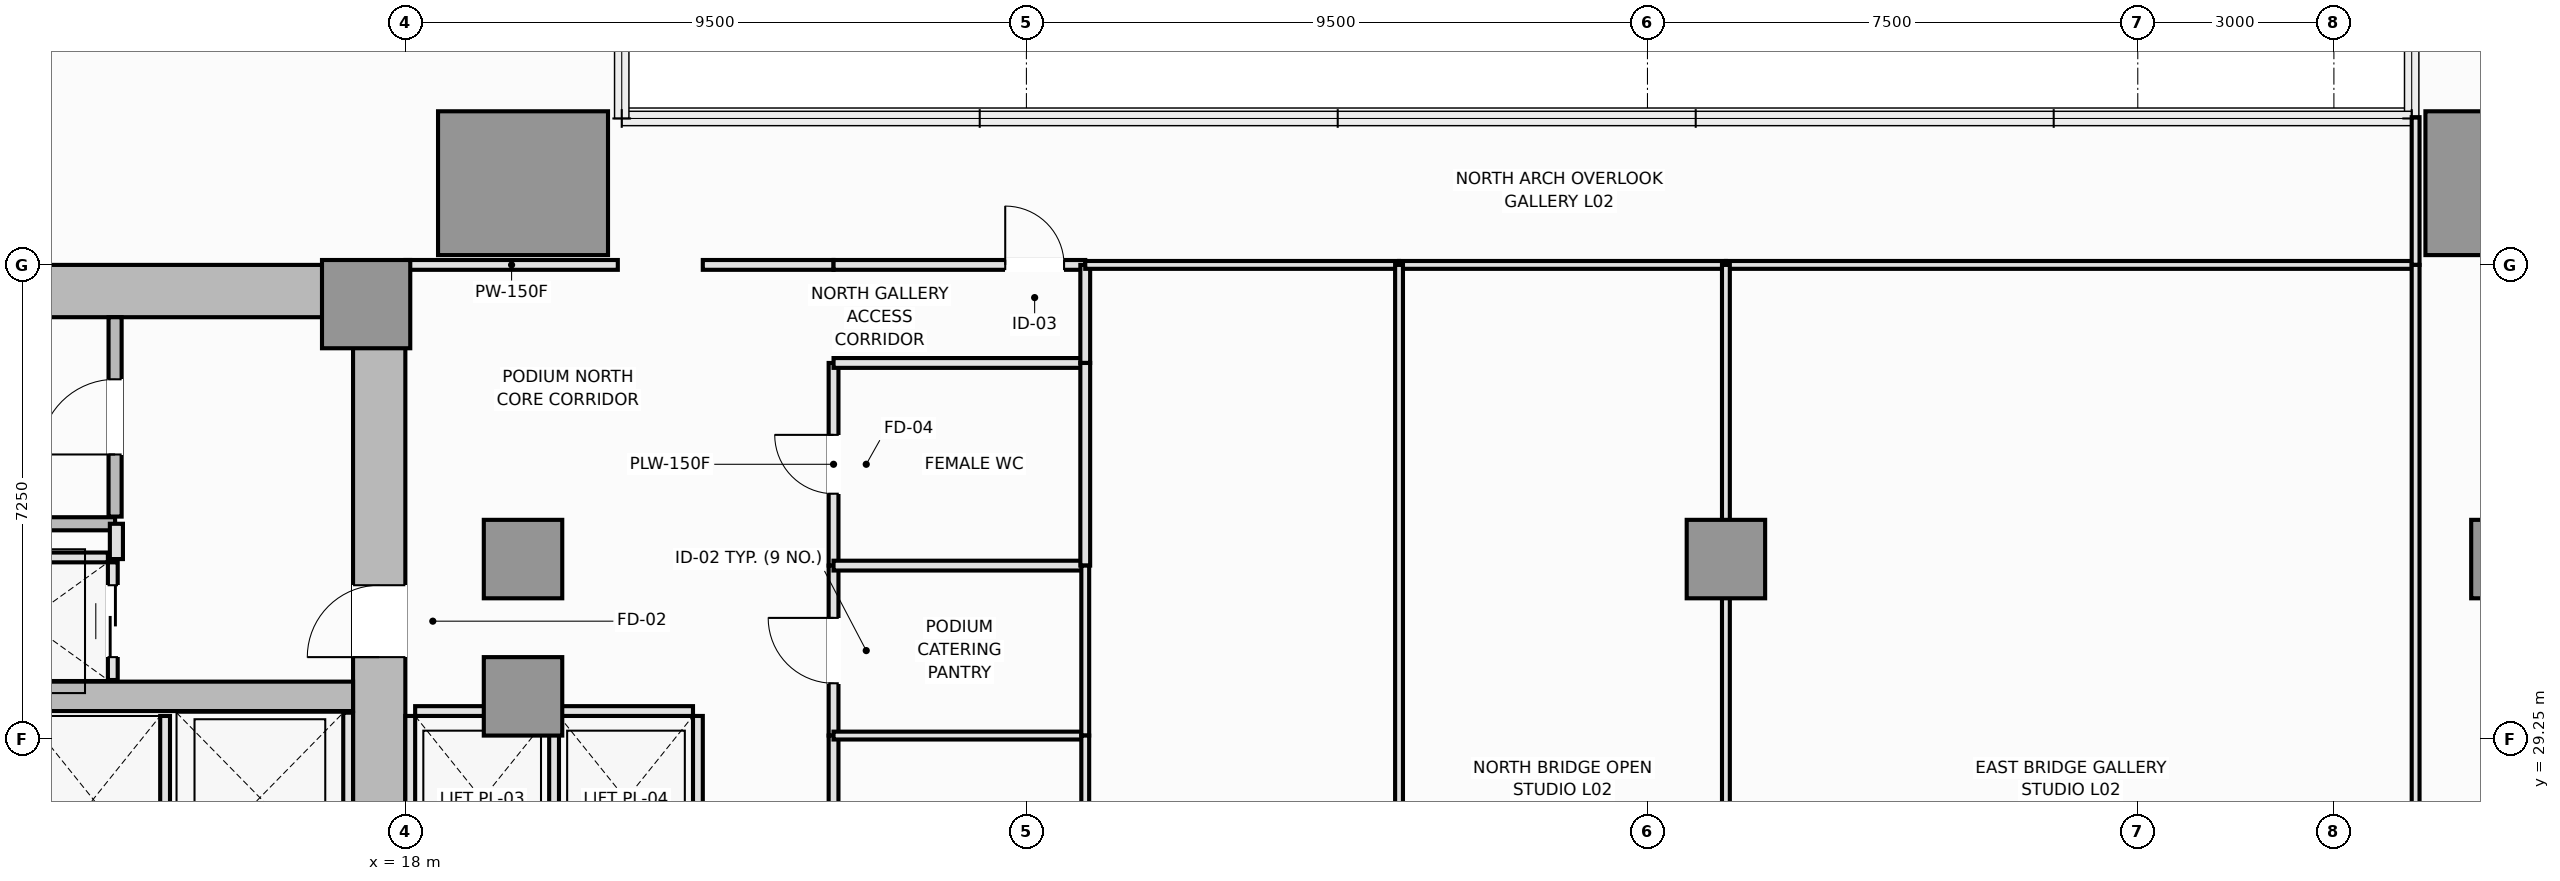
"""IFC4 building model, lengths in metres.
Left out: names, types, materials, properties, quantities, classifications, styles, units other than length and angle.
Written with IfcOpenShell. Run it as: python <this file> out.ifc"""

import sys

from ifc_helpers import new_model, si_unit, direction, frame, frame_2d, origin, origin_2d, place, context, subcontext, project, spatial, rectangle, extrude, element, fill, save


model = new_model("IFC4")
c1 = context("Model", 3, precision=1e-05, world=origin(), true_north=direction((0.0, 1.0)))
c2 = subcontext(c1, "Body", "Model", "MODEL_VIEW")
j1 = project(units=[si_unit("LENGTHUNIT", "METRE"), si_unit("PLANEANGLEUNIT", "RADIAN")], contexts=[c1])
p1 = place(None, origin())
s1 = spatial("IfcSite", under=j1, at=p1, CompositionType="ELEMENT")
p2 = place(p1, origin())
s2 = spatial("IfcBuilding", under=s1, at=p2, CompositionType="ELEMENT")
p3 = place(p2, frame((0.0, 0.0, 10.8)))
s3 = spatial("IfcBuildingStorey", under=s2, at=p3, CompositionType="ELEMENT", Elevation=10.8)
p4 = place(p3, frame((4.5, 36.1, 0.0), z_axis=(0.0, 0.0, 1.0), x_axis=(1.0, 0.0, 0.0)))
e1 = element("IfcWall", 1, at=p4, inside=s3, PredefinedType="SHEAR", context=c2, shape_type="SweptSolid", body=[
    extrude(rectangle(XDim=13.5, YDim=0.8, at=frame_2d((6.75, 0.0))), origin(), (0.0, 0.0, 1.0), 4.8),
])
p5 = place(p3, frame((17.6, 27.05, 0.0), z_axis=(0.0, 0.0, 1.0), x_axis=(0.0, 1.0, 0.0)))
e2 = element("IfcWall", 2, at=p5, inside=s3, PredefinedType="SHEAR", context=c2, shape_type="SweptSolid", body=[
    extrude(rectangle(XDim=8.65, YDim=0.8, at=frame_2d((4.325, 0.0))), origin(), (0.0, 0.0, 1.0), 4.8),
])
p6 = place(p5, frame((3.45, 0.0, 0.0)))
e3 = element("IfcOpeningElement", 3, at=p6, cuts=e2, PredefinedType="OPENING", context=c2, shape_type="SweptSolid", body=[
    extrude(rectangle(XDim=1.1, YDim=2.15, at=frame_2d((0.55, 1.075))), frame((0.0, 0.41, 0.0), z_axis=(0.0, -1.0, 0.0), x_axis=(1.0, 0.0, 0.0)), (0.0, 0.0, 1.0), 0.82),
])
p7 = place(p3, frame((5.3, 29.9, 0.0), z_axis=(0.0, 0.0, 1.0), x_axis=(1.0, 0.0, 0.0)))
e4 = element("IfcWall", 4, at=p7, inside=s3, PredefinedType="SHEAR", context=c2, shape_type="SweptSolid", body=[
    extrude(rectangle(XDim=11.9, YDim=0.45, at=frame_2d((5.95, 0.0))), origin(), (0.0, 0.0, 1.0), 4.8),
])
p8 = place(p3, frame((17.4, 35.9, 0.0), z_axis=(0.0, 0.0, 1.0), x_axis=(1.0, 0.0, 0.0)))
e5 = element("IfcColumn", 5, at=p8, inside=s3, PredefinedType="PILASTER", context=c2, shape_type="SweptSolid", body=[
    extrude(rectangle(XDim=1.35, YDim=1.35, at=origin_2d()), origin(), (0.0, 0.0, 1.0), 4.8),
])
p9 = place(p3, frame((38.2, 32.0, 0.0), z_axis=(0.0, 0.0, 1.0), x_axis=(1.0, 0.0, 0.0)))
e6 = element("IfcColumn", 6, at=p9, inside=s3, PredefinedType="COLUMN", context=c2, shape_type="SweptSolid", body=[
    extrude(rectangle(XDim=1.2, YDim=1.2, at=origin_2d()), origin(), (0.0, 0.0, 1.0), 4.8),
])
for number, where, z_axis, x_axis in (
    (7, (19.8, 37.75, 0.0), (0.0, 0.0, 1.0), (1.0, 0.0, 0.0)),
    (8, (50.2, 37.75, 0.0), (0.0, 0.0, 1.0), (1.0, 0.0, 0.0)),
):
    element("IfcColumn", number, at=place(p3, frame(where, z_axis=z_axis, x_axis=x_axis)), inside=s3, PredefinedType="COLUMN", context=c2, shape_type="SweptSolid", body=[
        extrude(rectangle(XDim=2.6, YDim=2.2, at=origin_2d()), origin(), (0.0, 0.0, 1.0), 4.8),
    ])
for number, where, z_axis, x_axis in (
    (9, (19.8, 29.9, 0.0), (0.0, 0.0, 1.0), (1.0, 0.0, 0.0)),
    (10, (19.8, 32.0, 0.0), (0.0, 0.0, 1.0), (1.0, 0.0, 0.0)),
    (11, (50.2, 32.0, 0.0), (0.0, 0.0, 1.0), (1.0, 0.0, 0.0)),
):
    element("IfcColumn", number, at=place(p3, frame(where, z_axis=z_axis, x_axis=x_axis)), inside=s3, PredefinedType="COLUMN", context=c2, shape_type="SweptSolid", body=[
        extrude(rectangle(XDim=1.2, YDim=1.2, at=origin_2d()), origin(), (0.0, 0.0, 1.0), 4.8),
    ])
p10 = place(p3, frame((5.9, 32.54, 0.0), z_axis=(0.0, 0.0, 1.0), x_axis=(1.0, 0.0, 0.0)))
e12 = element("IfcWall", 12, at=p10, inside=s3, PredefinedType="SOLIDWALL", context=c2, shape_type="SweptSolid", body=[
    extrude(rectangle(XDim=7.66, YDim=0.2, at=frame_2d((3.83, 0.0))), origin(), (0.0, 0.0, 1.0), 4.8),
])
p11 = place(p3, frame((13.56, 32.65, 0.0), z_axis=(0.0, 0.0, 1.0), x_axis=(0.0, 1.0, 0.0)))
e13 = element("IfcWall", 13, at=p11, inside=s3, PredefinedType="SOLIDWALL", context=c2, shape_type="SweptSolid", body=[
    extrude(rectangle(XDim=3.05, YDim=0.2, at=frame_2d((1.525, 0.0))), origin(), (0.0, 0.0, 1.0), 4.8),
])
p12 = place(p11, frame((0.95, 0.0, 0.0)))
e14 = element("IfcOpeningElement", 14, at=p12, cuts=e13, PredefinedType="OPENING", context=c2, shape_type="SweptSolid", body=[
    extrude(rectangle(XDim=1.15, YDim=2.15, at=frame_2d((0.575, 1.075))), frame((0.0, 0.11, 0.0), z_axis=(0.0, -1.0, 0.0), x_axis=(1.0, 0.0, 0.0)), (0.0, 0.0, 1.0), 0.22),
])
p13 = place(p3, frame((18.15, 29.675, 0.0), z_axis=(0.0, 0.0, 1.0), x_axis=(1.0, 0.0, 0.0)))
e15 = element("IfcWall", 15, at=p13, inside=s3, PredefinedType="PARTITIONING", context=c2, shape_type="SweptSolid", body=[
    extrude(rectangle(XDim=2.05, YDim=0.15, at=frame_2d((1.025, 0.0))), origin(), (0.0, 0.0, 1.0), 4.6),
])
for number, where, z_axis, x_axis in (
    (16, (18.075, 27.05, 0.0), (0.0, 0.0, 1.0), (0.0, 1.0, 0.0)),
    (17, (20.275, 27.05, 0.0), (0.0, 0.0, 1.0), (0.0, 1.0, 0.0)),
):
    element("IfcWall", number, at=place(p3, frame(where, z_axis=z_axis, x_axis=x_axis)), inside=s3, PredefinedType="PARTITIONING", context=c2, shape_type="SweptSolid", body=[
        extrude(rectangle(XDim=2.55, YDim=0.15, at=frame_2d((1.275, 0.0))), origin(), (0.0, 0.0, 1.0), 4.6),
    ])
p14 = place(p3, frame((20.35, 29.675, 0.0), z_axis=(0.0, 0.0, 1.0), x_axis=(1.0, 0.0, 0.0)))
e18 = element("IfcWall", 18, at=p14, inside=s3, PredefinedType="PARTITIONING", context=c2, shape_type="SweptSolid", body=[
    extrude(rectangle(XDim=2.05, YDim=0.15, at=frame_2d((1.025, 0.0))), origin(), (0.0, 0.0, 1.0), 4.6),
])
for number, where, z_axis, x_axis in (
    (19, (22.475, 27.05, 0.0), (0.0, 0.0, 1.0), (0.0, 1.0, 0.0)),
    (20, (14.325, 27.05, 0.0), (0.0, 0.0, 1.0), (0.0, 1.0, 0.0)),
):
    element("IfcWall", number, at=place(p3, frame(where, z_axis=z_axis, x_axis=x_axis)), inside=s3, PredefinedType="PARTITIONING", context=c2, shape_type="SweptSolid", body=[
        extrude(rectangle(XDim=2.55, YDim=0.15, at=frame_2d((1.275, 0.0))), origin(), (0.0, 0.0, 1.0), 4.6),
    ])
p15 = place(p3, frame((17.125, 27.05, 0.0), z_axis=(0.0, 0.0, 1.0), x_axis=(0.0, 1.0, 0.0)))
e21 = element("IfcWall", 21, at=p15, inside=s3, PredefinedType="PARTITIONING", context=c2, shape_type="SweptSolid", body=[
    extrude(rectangle(XDim=2.6, YDim=0.15, at=frame_2d((1.3, 0.0))), origin(), (0.0, 0.0, 1.0), 4.6),
])
p16 = place(p3, frame((10.95, 32.025, 0.0), z_axis=(0.0, 0.0, 1.0), x_axis=(1.0, 0.0, 0.0)))
e22 = element("IfcWall", 22, at=p16, inside=s3, PredefinedType="PARTITIONING", context=c2, shape_type="SweptSolid", body=[
    extrude(rectangle(XDim=2.5, YDim=0.15, at=frame_2d((1.25, 0.0))), origin(), (0.0, 0.0, 1.0), 4.6),
])
p17 = place(p3, frame((13.525, 30.15, 0.0), z_axis=(0.0, 0.0, 1.0), x_axis=(0.0, 1.0, 0.0)))
e23 = element("IfcWall", 23, at=p17, inside=s3, PredefinedType="PARTITIONING", context=c2, shape_type="SweptSolid", body=[
    extrude(rectangle(XDim=1.8, YDim=0.15, at=frame_2d((0.9, 0.0))), origin(), (0.0, 0.0, 1.0), 4.6),
])
p18 = place(p17, frame((0.35, 0.0, 0.0)))
e24 = element("IfcOpeningElement", 24, at=p18, cuts=e23, PredefinedType="OPENING", context=c2, shape_type="SweptSolid", body=[
    extrude(rectangle(XDim=1.1, YDim=2.2, at=frame_2d((0.55, 1.1))), frame((0.0, 0.085, 0.0), z_axis=(0.0, -1.0, 0.0), x_axis=(1.0, 0.0, 0.0)), (0.0, 0.0, 1.0), 0.17),
])
p19 = place(p3, frame((13.58, 32.0, 0.0), z_axis=(0.0, 0.0, 1.0), x_axis=(0.0, 1.0, 0.0)))
e25 = element("IfcWall", 25, at=p19, inside=s3, PredefinedType="PARTITIONING", context=c2, shape_type="SweptSolid", body=[
    extrude(rectangle(XDim=0.54, YDim=0.2, at=frame_2d((0.27, 0.0))), origin(), (0.0, 0.0, 1.0), 4.6),
])
p20 = place(p3, frame((18.0, 36.5, 0.0), z_axis=(0.0, 0.0, 1.0), x_axis=(1.0, 0.0, 0.0)))
e26 = element("IfcWall", 26, at=p20, inside=s3, PredefinedType="PARTITIONING", context=c2, shape_type="SweptSolid", body=[
    extrude(rectangle(XDim=3.25, YDim=0.15, at=frame_2d((1.625, 0.0))), origin(), (0.0, 0.0, 1.0), 4.6),
])
p21 = place(p3, frame((22.55, 36.5, 0.0), z_axis=(0.0, 0.0, 1.0), x_axis=(1.0, 0.0, 0.0)))
e27 = element("IfcWall", 27, at=p21, inside=s3, PredefinedType="PARTITIONING", context=c2, shape_type="SweptSolid", body=[
    extrude(rectangle(XDim=2.0, YDim=0.15, at=frame_2d((1.0, 0.0))), origin(), (0.0, 0.0, 1.0), 4.6),
])
p22 = place(p3, frame((24.55, 31.9, 0.0), z_axis=(0.0, 0.0, 1.0), x_axis=(0.0, 1.0, 0.0)))
e28 = element("IfcWall", 28, at=p22, inside=s3, PredefinedType="PLUMBINGWALL", context=c2, shape_type="SweptSolid", body=[
    extrude(rectangle(XDim=3.1, YDim=0.15, at=frame_2d((1.55, 0.0))), origin(), (0.0, 0.0, 1.0), 4.6),
])
p23 = place(p22, frame((1.1, 0.0, 0.0)))
e29 = element("IfcOpeningElement", 29, at=p23, cuts=e28, PredefinedType="OPENING", context=c2, shape_type="SweptSolid", body=[
    extrude(rectangle(XDim=0.9, YDim=2.1, at=frame_2d((0.45, 1.05))), frame((0.0, 0.085, 0.0), z_axis=(0.0, -1.0, 0.0), x_axis=(1.0, 0.0, 0.0)), (0.0, 0.0, 1.0), 0.17),
])
p24 = place(p3, frame((24.55, 29.3, 0.0), z_axis=(0.0, 0.0, 1.0), x_axis=(0.0, 1.0, 0.0)))
e30 = element("IfcWall", 30, at=p24, inside=s3, PredefinedType="PARTITIONING", context=c2, shape_type="SweptSolid", body=[
    extrude(rectangle(XDim=2.6, YDim=0.15, at=frame_2d((1.3, 0.0))), origin(), (0.0, 0.0, 1.0), 4.6),
])
p25 = place(p24, frame((0.8, 0.0, 0.0)))
e31 = element("IfcOpeningElement", 31, at=p25, cuts=e30, PredefinedType="OPENING", context=c2, shape_type="SweptSolid", body=[
    extrude(rectangle(XDim=1.0, YDim=2.15, at=frame_2d((0.5, 1.075))), frame((0.0, 0.085, 0.0), z_axis=(0.0, -1.0, 0.0), x_axis=(1.0, 0.0, 0.0)), (0.0, 0.0, 1.0), 0.17),
])
p26 = place(p3, frame((24.55, 21.7, 0.0), z_axis=(0.0, 0.0, 1.0), x_axis=(0.0, 1.0, 0.0)))
e32 = element("IfcWall", 32, at=p26, inside=s3, PredefinedType="PARTITIONING", context=c2, shape_type="SweptSolid", body=[
    extrude(rectangle(XDim=7.6, YDim=0.15, at=frame_2d((3.8, 0.0))), origin(), (0.0, 0.0, 1.0), 4.6),
])
p27 = place(p26, frame((3.3, 0.0, 0.0)))
e33 = element("IfcOpeningElement", 33, at=p27, cuts=e32, PredefinedType="OPENING", context=c2, shape_type="SweptSolid", body=[
    extrude(rectangle(XDim=1.0, YDim=2.15, at=frame_2d((0.5, 1.075))), frame((0.0, 0.085, 0.0), z_axis=(0.0, -1.0, 0.0), x_axis=(1.0, 0.0, 0.0)), (0.0, 0.0, 1.0), 0.17),
])
p28 = place(p3, frame((24.55, 36.5, 0.0), z_axis=(0.0, 0.0, 1.0), x_axis=(1.0, 0.0, 0.0)))
e34 = element("IfcWall", 34, at=p28, inside=s3, PredefinedType="PARTITIONING", context=c2, shape_type="SweptSolid", body=[
    extrude(rectangle(XDim=3.85, YDim=0.15, at=frame_2d((1.925, 0.0))), origin(), (0.0, 0.0, 1.0), 4.6),
])
p29 = place(p28, frame((2.626, 0.0, 0.0)))
e35 = element("IfcOpeningElement", 35, at=p29, cuts=e34, PredefinedType="OPENING", context=c2, shape_type="SweptSolid", body=[
    extrude(rectangle(XDim=0.9, YDim=2.1, at=frame_2d((0.45, 1.05))), frame((0.0, 0.085, 0.0), z_axis=(0.0, -1.0, 0.0), x_axis=(1.0, 0.0, 0.0)), (0.0, 0.0, 1.0), 0.17),
])
p30 = place(p3, frame((24.55, 35.0, 0.0), z_axis=(0.0, 0.0, 1.0), x_axis=(1.0, 0.0, 0.0)))
e36 = element("IfcWall", 36, at=p30, inside=s3, PredefinedType="PLUMBINGWALL", context=c2, shape_type="SweptSolid", body=[
    extrude(rectangle(XDim=3.85, YDim=0.15, at=frame_2d((1.925, 0.0))), origin(), (0.0, 0.0, 1.0), 4.6),
])
p31 = place(p3, frame((28.4, 35.0, 0.0), z_axis=(0.0, 0.0, 1.0), x_axis=(0.0, 1.0, 0.0)))
e37 = element("IfcWall", 37, at=p31, inside=s3, PredefinedType="PARTITIONING", context=c2, shape_type="SweptSolid", body=[
    extrude(rectangle(XDim=1.5, YDim=0.15, at=frame_2d((0.75, 0.0))), origin(), (0.0, 0.0, 1.0), 4.6),
])
p32 = place(p3, frame((28.4, 36.5, 0.0), z_axis=(0.0, 0.0, 1.0), x_axis=(1.0, 0.0, 0.0)))
e38 = element("IfcWall", 38, at=p32, inside=s3, PredefinedType="PARTITIONING", context=c2, shape_type="SweptSolid", body=[
    extrude(rectangle(XDim=4.8, YDim=0.12, at=frame_2d((2.4, 0.0))), origin(), (0.0, 0.0, 1.0), 4.6),
])
p33 = place(p3, frame((33.2, 36.5, 0.0), z_axis=(0.0, 0.0, 1.0), x_axis=(1.0, 0.0, 0.0)))
e39 = element("IfcWall", 39, at=p33, inside=s3, PredefinedType="PARTITIONING", context=c2, shape_type="SweptSolid", body=[
    extrude(rectangle(XDim=5.0, YDim=0.12, at=frame_2d((2.5, 0.0))), origin(), (0.0, 0.0, 1.0), 4.6),
])
p34 = place(p3, frame((38.2, 36.5, 0.0), z_axis=(0.0, 0.0, 1.0), x_axis=(1.0, 0.0, 0.0)))
e40 = element("IfcWall", 40, at=p34, inside=s3, PredefinedType="PARTITIONING", context=c2, shape_type="SweptSolid", body=[
    extrude(rectangle(XDim=10.55, YDim=0.12, at=frame_2d((5.275, 0.0))), origin(), (0.0, 0.0, 1.0), 4.6),
])
p35 = place(p3, frame((48.75, 36.5, 0.0), z_axis=(0.0, 0.0, 1.0), x_axis=(0.0, 1.0, 0.0)))
e41 = element("IfcWall", 41, at=p35, inside=s3, PredefinedType="PARTITIONING", context=c2, shape_type="SweptSolid", body=[
    extrude(rectangle(XDim=2.26, YDim=0.12, at=frame_2d((1.13, 0.0))), origin(), (0.0, 0.0, 1.0), 4.6),
])
p36 = place(p3, frame((24.55, 31.9, 0.0), z_axis=(0.0, 0.0, 1.0), x_axis=(1.0, 0.0, 0.0)))
e42 = element("IfcWall", 42, at=p36, inside=s3, PredefinedType="PLUMBINGWALL", context=c2, shape_type="SweptSolid", body=[
    extrude(rectangle(XDim=3.85, YDim=0.15, at=frame_2d((1.925, 0.0))), origin(), (0.0, 0.0, 1.0), 3.8),
])
p37 = place(p3, frame((28.4, 31.9, 0.0), z_axis=(0.0, 0.0, 1.0), x_axis=(0.0, 1.0, 0.0)))
e43 = element("IfcWall", 43, at=p37, inside=s3, PredefinedType="PLUMBINGWALL", context=c2, shape_type="SweptSolid", body=[
    extrude(rectangle(XDim=3.1, YDim=0.15, at=frame_2d((1.55, 0.0))), origin(), (0.0, 0.0, 1.0), 4.6),
])
p38 = place(p3, frame((24.55, 29.3, 0.0), z_axis=(0.0, 0.0, 1.0), x_axis=(1.0, 0.0, 0.0)))
e44 = element("IfcWall", 44, at=p38, inside=s3, PredefinedType="PARTITIONING", context=c2, shape_type="SweptSolid", body=[
    extrude(rectangle(XDim=3.85, YDim=0.12, at=frame_2d((1.925, 0.0))), origin(), (0.0, 0.0, 1.0), 4.6),
])
p39 = place(p3, frame((28.4, 29.3, 0.0), z_axis=(0.0, 0.0, 1.0), x_axis=(0.0, 1.0, 0.0)))
e45 = element("IfcWall", 45, at=p39, inside=s3, PredefinedType="PARTITIONING", context=c2, shape_type="SweptSolid", body=[
    extrude(rectangle(XDim=2.6, YDim=0.12, at=frame_2d((1.3, 0.0))), origin(), (0.0, 0.0, 1.0), 4.6),
])
p40 = place(p3, frame((28.4, 21.7, 0.0), z_axis=(0.0, 0.0, 1.0), x_axis=(0.0, 1.0, 0.0)))
e46 = element("IfcWall", 46, at=p40, inside=s3, PredefinedType="PARTITIONING", context=c2, shape_type="SweptSolid", body=[
    extrude(rectangle(XDim=7.6, YDim=0.12, at=frame_2d((3.8, 0.0))), origin(), (0.0, 0.0, 1.0), 4.6),
])
p41 = place(p3, frame((33.2, 21.7, 0.0), z_axis=(0.0, 0.0, 1.0), x_axis=(0.0, 1.0, 0.0)))
e47 = element("IfcWall", 47, at=p41, inside=s3, PredefinedType="PARTITIONING", context=c2, shape_type="SweptSolid", body=[
    extrude(rectangle(XDim=14.8, YDim=0.12, at=frame_2d((7.4, 0.0))), origin(), (0.0, 0.0, 1.0), 4.6),
])
p42 = place(p3, frame((38.2, 21.7, 0.0), z_axis=(0.0, 0.0, 1.0), x_axis=(0.0, 1.0, 0.0)))
e48 = element("IfcWall", 48, at=p42, inside=s3, PredefinedType="PARTITIONING", context=c2, shape_type="SweptSolid", body=[
    extrude(rectangle(XDim=14.8, YDim=0.12, at=frame_2d((7.4, 0.0))), origin(), (0.0, 0.0, 1.0), 4.0),
])
p43 = place(p3, frame((48.75, 21.7, 0.0), z_axis=(0.0, 0.0, 1.0), x_axis=(0.0, 1.0, 0.0)))
e49 = element("IfcWall", 49, at=p43, inside=s3, PredefinedType="PARTITIONING", context=c2, shape_type="SweptSolid", body=[
    extrude(rectangle(XDim=14.8, YDim=0.12, at=frame_2d((7.4, 0.0))), origin(), (0.0, 0.0, 1.0), 4.6),
])
p44 = place(p12, origin())
e50 = element("IfcDoor", 50, at=p44, inside=s3, OperationType="SINGLE_SWING_LEFT", PredefinedType="DOOR", context=c2, shape_type="SweptSolid", body=[
    extrude(rectangle(XDim=1.15, YDim=2.15, at=frame_2d((0.575, 1.075))), frame((0.0, 0.025, 0.0), z_axis=(0.0, -1.0, 0.0), x_axis=(1.0, 0.0, 0.0)), (0.0, 0.0, 1.0), 0.05),
])
fill(e14, e50)
p45 = place(p18, origin())
e51 = element("IfcDoor", 51, at=p45, inside=s3, OperationType="DOUBLE_DOOR_SLIDING", PredefinedType="DOOR", context=c2, shape_type="SweptSolid", body=[
    extrude(rectangle(XDim=1.1, YDim=2.2, at=frame_2d((0.55, 1.1))), frame((0.0, 0.025, 0.0), z_axis=(0.0, -1.0, 0.0), x_axis=(1.0, 0.0, 0.0)), (0.0, 0.0, 1.0), 0.05),
])
fill(e24, e51)
p46 = place(p6, origin())
e52 = element("IfcDoor", 52, at=p46, inside=s3, OperationType="SINGLE_SWING_LEFT", PredefinedType="DOOR", context=c2, shape_type="SweptSolid", body=[
    extrude(rectangle(XDim=1.1, YDim=2.15, at=frame_2d((0.55, 1.075))), frame((0.0, 0.025, 0.0), z_axis=(0.0, -1.0, 0.0), x_axis=(1.0, 0.0, 0.0)), (0.0, 0.0, 1.0), 0.05),
])
fill(e3, e52)
p47 = place(p23, origin())
e53 = element("IfcDoor", 53, at=p47, inside=s3, OperationType="SINGLE_SWING_RIGHT", PredefinedType="DOOR", context=c2, shape_type="SweptSolid", body=[
    extrude(rectangle(XDim=0.9, YDim=2.1, at=frame_2d((0.45, 1.05))), frame((0.0, 0.025, 0.0), z_axis=(0.0, -1.0, 0.0), x_axis=(1.0, 0.0, 0.0)), (0.0, 0.0, 1.0), 0.05),
])
fill(e29, e53)
p48 = place(p25, origin())
e54 = element("IfcDoor", 54, at=p48, inside=s3, OperationType="SINGLE_SWING_RIGHT", PredefinedType="DOOR", context=c2, shape_type="SweptSolid", body=[
    extrude(rectangle(XDim=1.0, YDim=2.15, at=frame_2d((0.5, 1.075))), frame((0.0, 0.025, 0.0), z_axis=(0.0, -1.0, 0.0), x_axis=(1.0, 0.0, 0.0)), (0.0, 0.0, 1.0), 0.05),
])
fill(e31, e54)
p49 = place(p29, origin())
e55 = element("IfcDoor", 55, at=p49, inside=s3, OperationType="SINGLE_SWING_LEFT", PredefinedType="DOOR", context=c2, shape_type="SweptSolid", body=[
    extrude(rectangle(XDim=0.9, YDim=2.1, at=frame_2d((0.45, 1.05))), frame((0.0, 0.025, 0.0), z_axis=(0.0, -1.0, 0.0), x_axis=(1.0, 0.0, 0.0)), (0.0, 0.0, 1.0), 0.05),
])
fill(e35, e55)
save(model, sys.argv[1])
